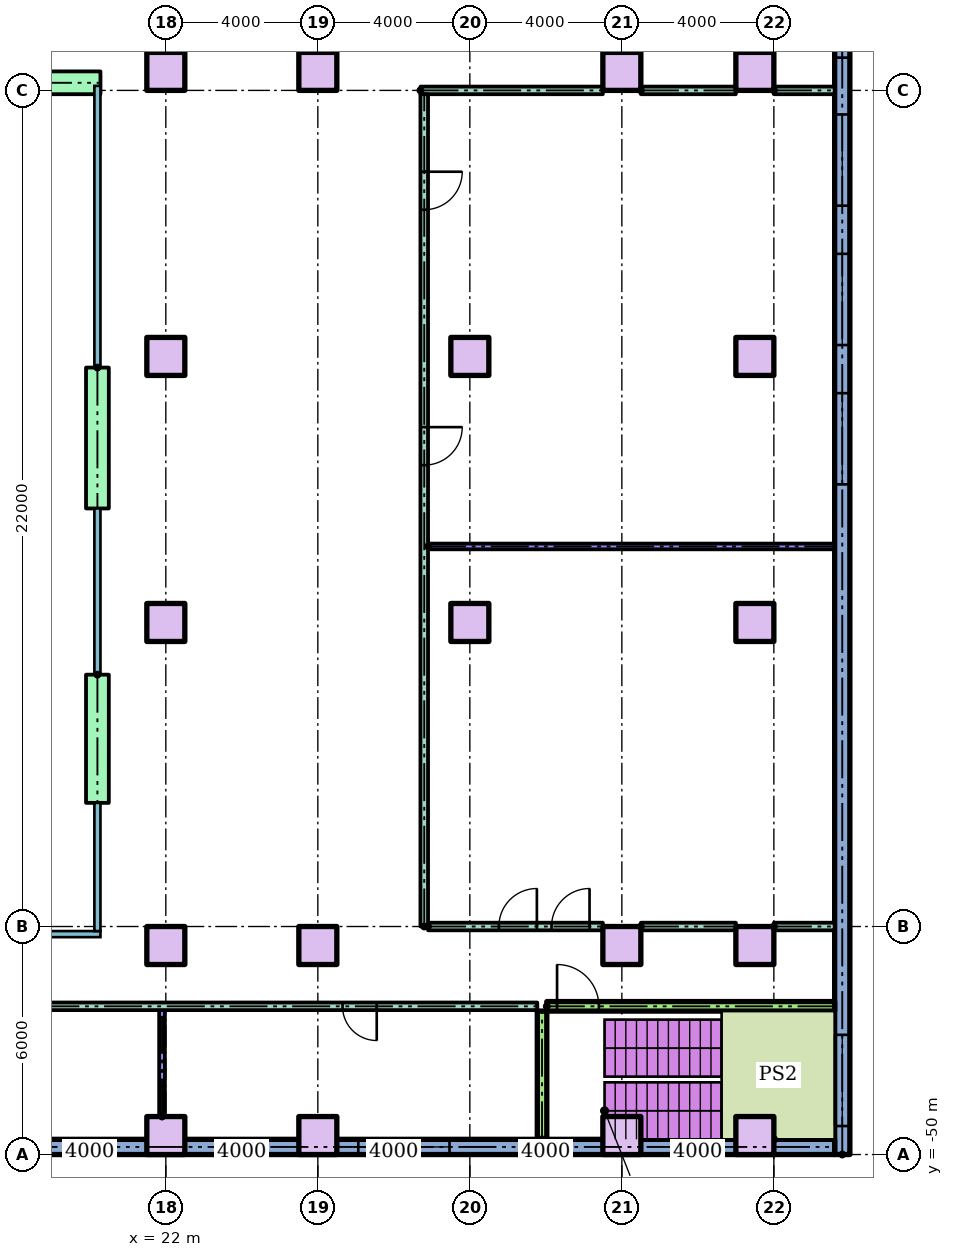
"""IFC4 building model, lengths in metres.
Left out: names, types, materials, properties, quantities, classifications, styles, units other than length and angle.
Written with IfcOpenShell. Run it as: python <this file> out.ifc"""

import sys

from ifc_helpers import new_model, si_unit, direction, frame, frame_2d, origin, origin_2d, place, context, subcontext, project, spatial, rectangle, extrude, element, fill, save


model = new_model("IFC4")
c1 = context("Model", 3, precision=1e-05, world=origin(), true_north=direction((0.0, 1.0)))
c2 = subcontext(c1, "Body", "Model", "MODEL_VIEW")
j1 = project(units=[si_unit("LENGTHUNIT", "METRE"), si_unit("PLANEANGLEUNIT", "RADIAN")], contexts=[c1])
p1 = place(None, origin())
s1 = spatial("IfcSite", under=j1, at=p1, CompositionType="ELEMENT")
p2 = place(p1, origin())
s2 = spatial("IfcBuilding", under=s1, at=p2, CompositionType="ELEMENT")
p3 = place(p2, frame((0.0, 0.0, 10.0)))
s3 = spatial("IfcBuildingStorey", under=s2, at=p3, CompositionType="ELEMENT", Elevation=10.0)
for number, where in (
    (1, (22.0, -49.5, 0.0)),
    (2, (26.0, -49.5, 0.0)),
    (3, (34.0, -49.5, 0.0)),
    (4, (37.5, -49.5, 0.0)),
    (5, (22.0, -44.5, 0.0)),
    (6, (26.0, -44.5, 0.0)),
    (7, (34.0, -44.5, 0.0)),
    (8, (37.5, -44.5, 0.0)),
    (9, (22.0, -36.0, 0.0)),
    (10, (30.0, -36.0, 0.0)),
    (11, (37.5, -36.0, 0.0)),
    (12, (22.0, -29.0, 0.0)),
    (13, (30.0, -29.0, 0.0)),
    (14, (37.5, -29.0, 0.0)),
    (15, (22.0, -21.5, 0.0)),
    (16, (26.0, -21.5, 0.0)),
    (17, (34.0, -21.5, 0.0)),
    (18, (37.5, -21.5, 0.0)),
):
    element("IfcColumn", number, at=place(p3, frame(where)), inside=s3, PredefinedType="COLUMN", context=c2, shape_type="SweptSolid", body=[
        extrude(rectangle(XDim=1.0, YDim=1.0, at=origin_2d()), origin(), (0.0, 0.0, 1.0), 4.0),
    ])
p4 = place(p3, frame((39.8, -50.0, 0.0), z_axis=(0.0, 0.0, 1.0), x_axis=(0.0, 1.0, 0.0)))
e19 = element("IfcWall", 19, at=p4, inside=s3, PredefinedType="STANDARD", context=c2, shape_type="SweptSolid", body=[
    extrude(rectangle(XDim=70.0, YDim=0.4, at=frame_2d((35.0, 0.0))), origin(), (0.0, 0.0, 1.0), 3.7),
])
p5 = place(p4, frame((0.75, 0.0, 0.9)))
e20 = element("IfcOpeningElement", 20, at=p5, cuts=e19, PredefinedType="OPENING", context=c2, shape_type="SweptSolid", body=[
    extrude(rectangle(XDim=2.4, YDim=2.1, at=frame_2d((1.2, 1.05))), frame((0.0, 0.21, 0.0), z_axis=(0.0, -1.0, 0.0), x_axis=(1.0, 0.0, 0.0)), (0.0, 0.0, 1.0), 0.42),
])
p6 = place(p4, frame((17.633, 0.0, 0.9)))
e21 = element("IfcOpeningElement", 21, at=p6, cuts=e19, PredefinedType="OPENING", context=c2, shape_type="SweptSolid", body=[
    extrude(rectangle(XDim=2.4, YDim=2.1, at=frame_2d((1.2, 1.05))), frame((0.0, 0.21, 0.0), z_axis=(0.0, -1.0, 0.0), x_axis=(1.0, 0.0, 0.0)), (0.0, 0.0, 1.0), 0.42),
])
p7 = place(p4, frame((21.3, 0.0, 0.9)))
e22 = element("IfcOpeningElement", 22, at=p7, cuts=e19, PredefinedType="OPENING", context=c2, shape_type="SweptSolid", body=[
    extrude(rectangle(XDim=2.4, YDim=2.1, at=frame_2d((1.2, 1.05))), frame((0.0, 0.21, 0.0), z_axis=(0.0, -1.0, 0.0), x_axis=(1.0, 0.0, 0.0)), (0.0, 0.0, 1.0), 0.42),
])
p8 = place(p4, frame((24.967, 0.0, 0.9)))
e23 = element("IfcOpeningElement", 23, at=p8, cuts=e19, PredefinedType="OPENING", context=c2, shape_type="SweptSolid", body=[
    extrude(rectangle(XDim=2.4, YDim=2.1, at=frame_2d((1.2, 1.05))), frame((0.0, 0.21, 0.0), z_axis=(0.0, -1.0, 0.0), x_axis=(1.0, 0.0, 0.0)), (0.0, 0.0, 1.0), 0.42),
])
p9 = place(p4, frame((28.863, 0.0, 0.9)))
e24 = element("IfcOpeningElement", 24, at=p9, cuts=e19, PredefinedType="OPENING", context=c2, shape_type="SweptSolid", body=[
    extrude(rectangle(XDim=2.4, YDim=2.1, at=frame_2d((1.2, 1.05))), frame((0.0, 0.21, 0.0), z_axis=(0.0, -1.0, 0.0), x_axis=(1.0, 0.0, 0.0)), (0.0, 0.0, 1.0), 0.42),
])
p10 = place(p4, frame((32.988, 0.0, 0.9)))
e25 = element("IfcOpeningElement", 25, at=p10, cuts=e19, PredefinedType="OPENING", context=c2, shape_type="SweptSolid", body=[
    extrude(rectangle(XDim=2.4, YDim=2.1, at=frame_2d((1.2, 1.05))), frame((0.0, 0.21, 0.0), z_axis=(0.0, -1.0, 0.0), x_axis=(1.0, 0.0, 0.0)), (0.0, 0.0, 1.0), 0.42),
])
p11 = place(p4, frame((37.113, 0.0, 0.9)))
e26 = element("IfcOpeningElement", 26, at=p11, cuts=e19, PredefinedType="OPENING", context=c2, shape_type="SweptSolid", body=[
    extrude(rectangle(XDim=2.4, YDim=2.1, at=frame_2d((1.2, 1.05))), frame((0.0, 0.21, 0.0), z_axis=(0.0, -1.0, 0.0), x_axis=(1.0, 0.0, 0.0)), (0.0, 0.0, 1.0), 0.42),
])
p12 = place(p4, frame((41.238, 0.0, 0.9)))
e27 = element("IfcOpeningElement", 27, at=p12, cuts=e19, PredefinedType="OPENING", context=c2, shape_type="SweptSolid", body=[
    extrude(rectangle(XDim=2.4, YDim=2.1, at=frame_2d((1.2, 1.05))), frame((0.0, 0.21, 0.0), z_axis=(0.0, -1.0, 0.0), x_axis=(1.0, 0.0, 0.0)), (0.0, 0.0, 1.0), 0.42),
])
p13 = place(p4, frame((45.363, 0.0, 0.9)))
e28 = element("IfcOpeningElement", 28, at=p13, cuts=e19, PredefinedType="OPENING", context=c2, shape_type="SweptSolid", body=[
    extrude(rectangle(XDim=2.4, YDim=2.1, at=frame_2d((1.2, 1.05))), frame((0.0, 0.21, 0.0), z_axis=(0.0, -1.0, 0.0), x_axis=(1.0, 0.0, 0.0)), (0.0, 0.0, 1.0), 0.42),
])
p14 = place(p4, frame((49.488, 0.0, 0.9)))
e29 = element("IfcOpeningElement", 29, at=p14, cuts=e19, PredefinedType="OPENING", context=c2, shape_type="SweptSolid", body=[
    extrude(rectangle(XDim=2.4, YDim=2.1, at=frame_2d((1.2, 1.05))), frame((0.0, 0.21, 0.0), z_axis=(0.0, -1.0, 0.0), x_axis=(1.0, 0.0, 0.0)), (0.0, 0.0, 1.0), 0.42),
])
p15 = place(p4, frame((53.613, 0.0, 0.9)))
e30 = element("IfcOpeningElement", 30, at=p15, cuts=e19, PredefinedType="OPENING", context=c2, shape_type="SweptSolid", body=[
    extrude(rectangle(XDim=2.4, YDim=2.1, at=frame_2d((1.2, 1.05))), frame((0.0, 0.21, 0.0), z_axis=(0.0, -1.0, 0.0), x_axis=(1.0, 0.0, 0.0)), (0.0, 0.0, 1.0), 0.42),
])
p16 = place(p4, frame((57.738, 0.0, 0.9)))
e31 = element("IfcOpeningElement", 31, at=p16, cuts=e19, PredefinedType="OPENING", context=c2, shape_type="SweptSolid", body=[
    extrude(rectangle(XDim=2.4, YDim=2.1, at=frame_2d((1.2, 1.05))), frame((0.0, 0.21, 0.0), z_axis=(0.0, -1.0, 0.0), x_axis=(1.0, 0.0, 0.0)), (0.0, 0.0, 1.0), 0.42),
])
p17 = place(p4, frame((62.05, 0.0, 0.9)))
e32 = element("IfcOpeningElement", 32, at=p17, cuts=e19, PredefinedType="OPENING", context=c2, shape_type="SweptSolid", body=[
    extrude(rectangle(XDim=2.4, YDim=2.1, at=frame_2d((1.2, 1.05))), frame((0.0, 0.21, 0.0), z_axis=(0.0, -1.0, 0.0), x_axis=(1.0, 0.0, 0.0)), (0.0, 0.0, 1.0), 0.42),
])
p18 = place(p4, frame((66.55, 0.0, 0.9)))
e33 = element("IfcOpeningElement", 33, at=p18, cuts=e19, PredefinedType="OPENING", context=c2, shape_type="SweptSolid", body=[
    extrude(rectangle(XDim=2.4, YDim=2.1, at=frame_2d((1.2, 1.05))), frame((0.0, 0.21, 0.0), z_axis=(0.0, -1.0, 0.0), x_axis=(1.0, 0.0, 0.0)), (0.0, 0.0, 1.0), 0.42),
])
p19 = place(p3, frame((-39.6, -49.8, 0.0)))
e34 = element("IfcWall", 34, at=p19, inside=s3, PredefinedType="STANDARD", context=c2, shape_type="SweptSolid", body=[
    extrude(rectangle(XDim=79.2, YDim=0.4, at=frame_2d((39.6, 0.0))), origin(), (0.0, 0.0, 1.0), 3.7),
])
p20 = place(p19, frame((14.135, 0.0, 0.9)))
e35 = element("IfcOpeningElement", 35, at=p20, cuts=e34, PredefinedType="OPENING", context=c2, shape_type="SweptSolid", body=[
    extrude(rectangle(XDim=2.4, YDim=2.1, at=frame_2d((1.2, 1.05))), frame((0.0, 0.21, 0.0), z_axis=(0.0, -1.0, 0.0), x_axis=(1.0, 0.0, 0.0)), (0.0, 0.0, 1.0), 0.42),
])
p21 = place(p19, frame((18.665, 0.0, 0.9)))
e36 = element("IfcOpeningElement", 36, at=p21, cuts=e34, PredefinedType="OPENING", context=c2, shape_type="SweptSolid", body=[
    extrude(rectangle(XDim=2.4, YDim=2.1, at=frame_2d((1.2, 1.05))), frame((0.0, 0.21, 0.0), z_axis=(0.0, -1.0, 0.0), x_axis=(1.0, 0.0, 0.0)), (0.0, 0.0, 1.0), 0.42),
])
p22 = place(p19, frame((22.135, 0.0, 0.9)))
e37 = element("IfcOpeningElement", 37, at=p22, cuts=e34, PredefinedType="OPENING", context=c2, shape_type="SweptSolid", body=[
    extrude(rectangle(XDim=2.4, YDim=2.1, at=frame_2d((1.2, 1.05))), frame((0.0, 0.21, 0.0), z_axis=(0.0, -1.0, 0.0), x_axis=(1.0, 0.0, 0.0)), (0.0, 0.0, 1.0), 0.42),
])
p23 = place(p19, frame((30.135, 0.0, 0.9)))
e38 = element("IfcOpeningElement", 38, at=p23, cuts=e34, PredefinedType="OPENING", context=c2, shape_type="SweptSolid", body=[
    extrude(rectangle(XDim=2.05, YDim=2.1, at=frame_2d((1.025, 1.05))), frame((0.0, 0.21, 0.0), z_axis=(0.0, -1.0, 0.0), x_axis=(1.0, 0.0, 0.0)), (0.0, 0.0, 1.0), 0.42),
])
p24 = place(p19, frame((38.135, 0.0, 0.9)))
e39 = element("IfcOpeningElement", 39, at=p24, cuts=e34, PredefinedType="OPENING", context=c2, shape_type="SweptSolid", body=[
    extrude(rectangle(XDim=2.4, YDim=2.1, at=frame_2d((1.2, 1.05))), frame((0.0, 0.21, 0.0), z_axis=(0.0, -1.0, 0.0), x_axis=(1.0, 0.0, 0.0)), (0.0, 0.0, 1.0), 0.42),
])
p25 = place(p19, frame((47.015, 0.0, 0.9)))
e40 = element("IfcOpeningElement", 40, at=p25, cuts=e34, PredefinedType="OPENING", context=c2, shape_type="SweptSolid", body=[
    extrude(rectangle(XDim=1.52, YDim=2.1, at=frame_2d((0.76, 1.05))), frame((0.0, 0.21, 0.0), z_axis=(0.0, -1.0, 0.0), x_axis=(1.0, 0.0, 0.0)), (0.0, 0.0, 1.0), 0.42),
])
p26 = place(p19, frame((54.135, 0.0, 0.9)))
e41 = element("IfcOpeningElement", 41, at=p26, cuts=e34, PredefinedType="OPENING", context=c2, shape_type="SweptSolid", body=[
    extrude(rectangle(XDim=2.4, YDim=2.1, at=frame_2d((1.2, 1.05))), frame((0.0, 0.21, 0.0), z_axis=(0.0, -1.0, 0.0), x_axis=(1.0, 0.0, 0.0)), (0.0, 0.0, 1.0), 0.42),
])
p27 = place(p19, frame((66.665, 0.0, 0.9)))
e42 = element("IfcOpeningElement", 42, at=p27, cuts=e34, PredefinedType="OPENING", context=c2, shape_type="SweptSolid", body=[
    extrude(rectangle(XDim=2.4, YDim=2.1, at=frame_2d((1.2, 1.05))), frame((0.0, 0.21, 0.0), z_axis=(0.0, -1.0, 0.0), x_axis=(1.0, 0.0, 0.0)), (0.0, 0.0, 1.0), 0.42),
])
p28 = place(p3, frame((18.53, -21.8, 0.0)))
e43 = element("IfcWall", 43, at=p28, inside=s3, PredefinedType="STANDARD", context=c2, shape_type="SweptSolid", body=[
    extrude(rectangle(XDim=1.75, YDim=0.6, at=frame_2d((0.875, 0.0))), origin(), (0.0, 0.0, 1.0), 3.7),
])
p29 = place(p3, frame((20.2, -29.293, 0.0), z_axis=(0.0, 0.0, 1.0), x_axis=(0.0, -1.0, 0.0)))
e44 = element("IfcWall", 44, at=p29, inside=s3, PredefinedType="STANDARD", context=c2, shape_type="SweptSolid", body=[
    extrude(rectangle(XDim=3.707, YDim=0.6, at=frame_2d((1.854, 0.0))), origin(), (0.0, 0.0, 1.0), 3.7),
])
p30 = place(p3, frame((20.2, -37.373, 0.0), z_axis=(0.0, 0.0, 1.0), x_axis=(0.0, -1.0, 0.0)))
e45 = element("IfcWall", 45, at=p30, inside=s3, PredefinedType="STANDARD", context=c2, shape_type="SweptSolid", body=[
    extrude(rectangle(XDim=3.373, YDim=0.6, at=frame_2d((1.687, 0.0))), origin(), (0.0, 0.0, 1.0), 3.7),
])
p31 = place(p3, frame((12.125, -46.1, 0.0)))
e46 = element("IfcWall", 46, at=p31, inside=s3, PredefinedType="PARTITIONING", context=c2, shape_type="SweptSolid", body=[
    extrude(rectangle(XDim=19.65, YDim=0.2, at=frame_2d((9.825, 0.0))), origin(), (0.0, 0.0, 1.0), 3.7),
])
p32 = place(p31, frame((4.325, 0.0, 0.0)))
e47 = element("IfcOpeningElement", 47, at=p32, cuts=e46, PredefinedType="OPENING", context=c2, shape_type="SweptSolid", body=[
    extrude(rectangle(XDim=0.9, YDim=2.1, at=frame_2d((0.45, 1.05))), frame((0.0, 0.11, 0.0), z_axis=(0.0, -1.0, 0.0), x_axis=(1.0, 0.0, 0.0)), (0.0, 0.0, 1.0), 0.22),
])
p33 = place(p31, frame((14.525, 0.0, 0.0)))
e48 = element("IfcOpeningElement", 48, at=p33, cuts=e46, PredefinedType="OPENING", context=c2, shape_type="SweptSolid", body=[
    extrude(rectangle(XDim=0.9, YDim=2.1, at=frame_2d((0.45, 1.05))), frame((0.0, 0.11, 0.0), z_axis=(0.0, -1.0, 0.0), x_axis=(1.0, 0.0, 0.0)), (0.0, 0.0, 1.0), 0.22),
])
p34 = place(p3, frame((32.025, -46.1, 0.0)))
e49 = element("IfcWall", 49, at=p34, inside=s3, PredefinedType="SOLIDWALL", context=c2, shape_type="SweptSolid", body=[
    extrude(rectangle(XDim=7.575, YDim=0.25, at=frame_2d((3.788, 0.0))), origin(), (0.0, 0.0, 1.0), 3.7),
])
p35 = place(p34, frame((0.27, 0.0, 0.0)))
e50 = element("IfcOpeningElement", 50, at=p35, cuts=e49, PredefinedType="OPENING", context=c2, shape_type="SweptSolid", body=[
    extrude(rectangle(XDim=1.1, YDim=2.1, at=frame_2d((0.55, 1.05))), frame((0.0, 0.135, 0.0), z_axis=(0.0, -1.0, 0.0), x_axis=(1.0, 0.0, 0.0)), (0.0, 0.0, 1.0), 0.27),
])
p36 = place(p3, frame((28.9, -44.0, 0.0)))
e51 = element("IfcWall", 51, at=p36, inside=s3, PredefinedType="PARTITIONING", context=c2, shape_type="SweptSolid", body=[
    extrude(rectangle(XDim=4.6, YDim=0.2, at=frame_2d((2.3, 0.0))), origin(), (0.0, 0.0, 1.0), 3.7),
])
p37 = place(p36, frame((1.864, 0.0, 0.0)))
e52 = element("IfcOpeningElement", 52, at=p37, cuts=e51, PredefinedType="OPENING", context=c2, shape_type="SweptSolid", body=[
    extrude(rectangle(XDim=1.0, YDim=2.1, at=frame_2d((0.5, 1.05))), frame((0.0, 0.11, 0.0), z_axis=(0.0, -1.0, 0.0), x_axis=(1.0, 0.0, 0.0)), (0.0, 0.0, 1.0), 0.22),
])
p38 = place(p36, frame((3.25, 0.0, 0.0)))
e53 = element("IfcOpeningElement", 53, at=p38, cuts=e51, PredefinedType="OPENING", context=c2, shape_type="SweptSolid", body=[
    extrude(rectangle(XDim=1.0, YDim=2.1, at=frame_2d((0.5, 1.05))), frame((0.0, 0.11, 0.0), z_axis=(0.0, -1.0, 0.0), x_axis=(1.0, 0.0, 0.0)), (0.0, 0.0, 1.0), 0.22),
])
p39 = place(p3, frame((34.5, -44.0, 0.0)))
e54 = element("IfcWall", 54, at=p39, inside=s3, PredefinedType="PARTITIONING", context=c2, shape_type="SweptSolid", body=[
    extrude(rectangle(XDim=2.5, YDim=0.2, at=frame_2d((1.25, 0.0))), origin(), (0.0, 0.0, 1.0), 3.7),
])
p40 = place(p3, frame((38.0, -44.0, 0.0)))
e55 = element("IfcWall", 55, at=p40, inside=s3, PredefinedType="PARTITIONING", context=c2, shape_type="SweptSolid", body=[
    extrude(rectangle(XDim=1.6, YDim=0.2, at=frame_2d((0.8, 0.0))), origin(), (0.0, 0.0, 1.0), 3.7),
])
p41 = place(p3, frame((28.9, -34.0, 0.0)))
e56 = element("IfcWall", 56, at=p41, inside=s3, PredefinedType="PARTITIONING", context=c2, shape_type="SweptSolid", body=[
    extrude(rectangle(XDim=10.7, YDim=0.15, at=frame_2d((5.35, 0.0))), origin(), (0.0, 0.0, 1.0), 3.7),
])
p42 = place(p3, frame((28.7, -22.0, 0.0)))
e57 = element("IfcWall", 57, at=p42, inside=s3, PredefinedType="PARTITIONING", context=c2, shape_type="SweptSolid", body=[
    extrude(rectangle(XDim=4.8, YDim=0.2, at=frame_2d((2.4, 0.0))), origin(), (0.0, 0.0, 1.0), 3.7),
])
p43 = place(p3, frame((34.5, -22.0, 0.0)))
e58 = element("IfcWall", 58, at=p43, inside=s3, PredefinedType="PARTITIONING", context=c2, shape_type="SweptSolid", body=[
    extrude(rectangle(XDim=2.5, YDim=0.2, at=frame_2d((1.25, 0.0))), origin(), (0.0, 0.0, 1.0), 3.7),
])
p44 = place(p3, frame((38.0, -22.0, 0.0)))
e59 = element("IfcWall", 59, at=p44, inside=s3, PredefinedType="PARTITIONING", context=c2, shape_type="SweptSolid", body=[
    extrude(rectangle(XDim=1.6, YDim=0.2, at=frame_2d((0.8, 0.0))), origin(), (0.0, 0.0, 1.0), 3.7),
])
p45 = place(p3, frame((21.9, -49.0, 0.0), z_axis=(0.0, 0.0, 1.0), x_axis=(0.0, 1.0, 0.0)))
e60 = element("IfcWall", 60, at=p45, inside=s3, PredefinedType="PARTITIONING", context=c2, shape_type="SweptSolid", body=[
    extrude(rectangle(XDim=2.8, YDim=0.15, at=frame_2d((1.4, 0.0))), origin(), (0.0, 0.0, 1.0), 3.7),
])
p46 = place(p3, frame((28.8, -44.0, 0.0), z_axis=(0.0, 0.0, 1.0), x_axis=(0.0, 1.0, 0.0)))
e61 = element("IfcWall", 61, at=p46, inside=s3, PredefinedType="PARTITIONING", context=c2, shape_type="SweptSolid", body=[
    extrude(rectangle(XDim=21.9, YDim=0.2, at=frame_2d((10.95, 0.0))), origin(), (0.0, 0.0, 1.0), 3.7),
])
p47 = place(p46, frame((12.14, 0.0, 0.0)))
e62 = element("IfcOpeningElement", 62, at=p47, cuts=e61, PredefinedType="OPENING", context=c2, shape_type="SweptSolid", body=[
    extrude(rectangle(XDim=1.0, YDim=2.1, at=frame_2d((0.5, 1.05))), frame((0.0, 0.11, 0.0), z_axis=(0.0, -1.0, 0.0), x_axis=(1.0, 0.0, 0.0)), (0.0, 0.0, 1.0), 0.22),
])
p48 = place(p46, frame((18.86, 0.0, 0.0)))
e63 = element("IfcOpeningElement", 63, at=p48, cuts=e61, PredefinedType="OPENING", context=c2, shape_type="SweptSolid", body=[
    extrude(rectangle(XDim=1.0, YDim=2.1, at=frame_2d((0.5, 1.05))), frame((0.0, 0.11, 0.0), z_axis=(0.0, -1.0, 0.0), x_axis=(1.0, 0.0, 0.0)), (0.0, 0.0, 1.0), 0.22),
])
p49 = place(p3, frame((31.9, -49.6, 0.0), z_axis=(0.0, 0.0, 1.0), x_axis=(0.0, 1.0, 0.0)))
e64 = element("IfcWall", 64, at=p49, inside=s3, PredefinedType="SOLIDWALL", context=c2, shape_type="SweptSolid", body=[
    extrude(rectangle(XDim=3.375, YDim=0.25, at=frame_2d((1.688, 0.0))), origin(), (0.0, 0.0, 1.0), 3.7),
])
p50 = place(p5, origin())
e65 = element("IfcWindow", 65, at=p50, inside=s3, PartitioningType="SINGLE_PANEL", PredefinedType="WINDOW", context=c2, shape_type="SweptSolid", body=[
    extrude(rectangle(XDim=2.4, YDim=2.1, at=frame_2d((1.2, 1.05))), frame((0.0, 0.03, 0.0), z_axis=(0.0, -1.0, 0.0), x_axis=(1.0, 0.0, 0.0)), (0.0, 0.0, 1.0), 0.06),
])
fill(e20, e65)
p51 = place(p6, origin())
e66 = element("IfcWindow", 66, at=p51, inside=s3, PartitioningType="SINGLE_PANEL", PredefinedType="WINDOW", context=c2, shape_type="SweptSolid", body=[
    extrude(rectangle(XDim=2.4, YDim=2.1, at=frame_2d((1.2, 1.05))), frame((0.0, 0.03, 0.0), z_axis=(0.0, -1.0, 0.0), x_axis=(1.0, 0.0, 0.0)), (0.0, 0.0, 1.0), 0.06),
])
fill(e21, e66)
p52 = place(p7, origin())
e67 = element("IfcWindow", 67, at=p52, inside=s3, PartitioningType="SINGLE_PANEL", PredefinedType="WINDOW", context=c2, shape_type="SweptSolid", body=[
    extrude(rectangle(XDim=2.4, YDim=2.1, at=frame_2d((1.2, 1.05))), frame((0.0, 0.03, 0.0), z_axis=(0.0, -1.0, 0.0), x_axis=(1.0, 0.0, 0.0)), (0.0, 0.0, 1.0), 0.06),
])
fill(e22, e67)
p53 = place(p8, origin())
e68 = element("IfcWindow", 68, at=p53, inside=s3, PartitioningType="SINGLE_PANEL", PredefinedType="WINDOW", context=c2, shape_type="SweptSolid", body=[
    extrude(rectangle(XDim=2.4, YDim=2.1, at=frame_2d((1.2, 1.05))), frame((0.0, 0.03, 0.0), z_axis=(0.0, -1.0, 0.0), x_axis=(1.0, 0.0, 0.0)), (0.0, 0.0, 1.0), 0.06),
])
fill(e23, e68)
p54 = place(p9, origin())
e69 = element("IfcWindow", 69, at=p54, inside=s3, PartitioningType="SINGLE_PANEL", PredefinedType="WINDOW", context=c2, shape_type="SweptSolid", body=[
    extrude(rectangle(XDim=2.4, YDim=2.1, at=frame_2d((1.2, 1.05))), frame((0.0, 0.03, 0.0), z_axis=(0.0, -1.0, 0.0), x_axis=(1.0, 0.0, 0.0)), (0.0, 0.0, 1.0), 0.06),
])
fill(e24, e69)
p55 = place(p27, origin())
e70 = element("IfcWindow", 70, at=p55, inside=s3, PartitioningType="SINGLE_PANEL", PredefinedType="WINDOW", context=c2, shape_type="SweptSolid", body=[
    extrude(rectangle(XDim=2.4, YDim=2.1, at=frame_2d((1.2, 1.05))), frame((0.0, 0.03, 0.0), z_axis=(0.0, -1.0, 0.0), x_axis=(1.0, 0.0, 0.0)), (0.0, 0.0, 1.0), 0.06),
])
fill(e42, e70)
p56 = place(p37, origin())
e71 = element("IfcDoor", 71, at=p56, inside=s3, OperationType="SINGLE_SWING_RIGHT", PredefinedType="DOOR", context=c2, shape_type="SweptSolid", body=[
    extrude(rectangle(XDim=1.0, YDim=2.1, at=frame_2d((0.5, 1.05))), frame((0.0, 0.025, 0.0), z_axis=(0.0, -1.0, 0.0), x_axis=(1.0, 0.0, 0.0)), (0.0, 0.0, 1.0), 0.05),
])
fill(e52, e71)
p57 = place(p38, origin())
e72 = element("IfcDoor", 72, at=p57, inside=s3, OperationType="SINGLE_SWING_RIGHT", PredefinedType="DOOR", context=c2, shape_type="SweptSolid", body=[
    extrude(rectangle(XDim=1.0, YDim=2.1, at=frame_2d((0.5, 1.05))), frame((0.0, 0.025, 0.0), z_axis=(0.0, -1.0, 0.0), x_axis=(1.0, 0.0, 0.0)), (0.0, 0.0, 1.0), 0.05),
])
fill(e53, e72)
p58 = place(p47, frame((1.0, 0.0, 0.0), z_axis=(0.0, 0.0, 1.0), x_axis=(-1.0, 0.0, 0.0)))
e73 = element("IfcDoor", 73, at=p58, inside=s3, OperationType="SINGLE_SWING_RIGHT", PredefinedType="DOOR", context=c2, shape_type="SweptSolid", body=[
    extrude(rectangle(XDim=1.0, YDim=2.1, at=frame_2d((0.5, 1.05))), frame((0.0, 0.025, 0.0), z_axis=(0.0, -1.0, 0.0), x_axis=(1.0, 0.0, 0.0)), (0.0, 0.0, 1.0), 0.05),
])
fill(e62, e73)
p59 = place(p48, frame((1.0, 0.0, 0.0), z_axis=(0.0, 0.0, 1.0), x_axis=(-1.0, 0.0, 0.0)))
e74 = element("IfcDoor", 74, at=p59, inside=s3, OperationType="SINGLE_SWING_RIGHT", PredefinedType="DOOR", context=c2, shape_type="SweptSolid", body=[
    extrude(rectangle(XDim=1.0, YDim=2.1, at=frame_2d((0.5, 1.05))), frame((0.0, 0.025, 0.0), z_axis=(0.0, -1.0, 0.0), x_axis=(1.0, 0.0, 0.0)), (0.0, 0.0, 1.0), 0.05),
])
fill(e63, e74)
p60 = place(p33, frame((0.9, 0.0, 0.0), z_axis=(0.0, 0.0, 1.0), x_axis=(-1.0, 0.0, 0.0)))
e75 = element("IfcDoor", 75, at=p60, inside=s3, OperationType="SINGLE_SWING_RIGHT", PredefinedType="DOOR", context=c2, shape_type="SweptSolid", body=[
    extrude(rectangle(XDim=0.9, YDim=2.1, at=frame_2d((0.45, 1.05))), frame((0.0, 0.025, 0.0), z_axis=(0.0, -1.0, 0.0), x_axis=(1.0, 0.0, 0.0)), (0.0, 0.0, 1.0), 0.05),
])
fill(e48, e75)
p61 = place(p35, origin())
e76 = element("IfcDoor", 76, at=p61, inside=s3, OperationType="SINGLE_SWING_LEFT", PredefinedType="DOOR", context=c2, shape_type="SweptSolid", body=[
    extrude(rectangle(XDim=1.1, YDim=2.1, at=frame_2d((0.55, 1.05))), frame((0.0, 0.025, 0.0), z_axis=(0.0, -1.0, 0.0), x_axis=(1.0, 0.0, 0.0)), (0.0, 0.0, 1.0), 0.05),
])
fill(e50, e76)
save(model, sys.argv[1])
